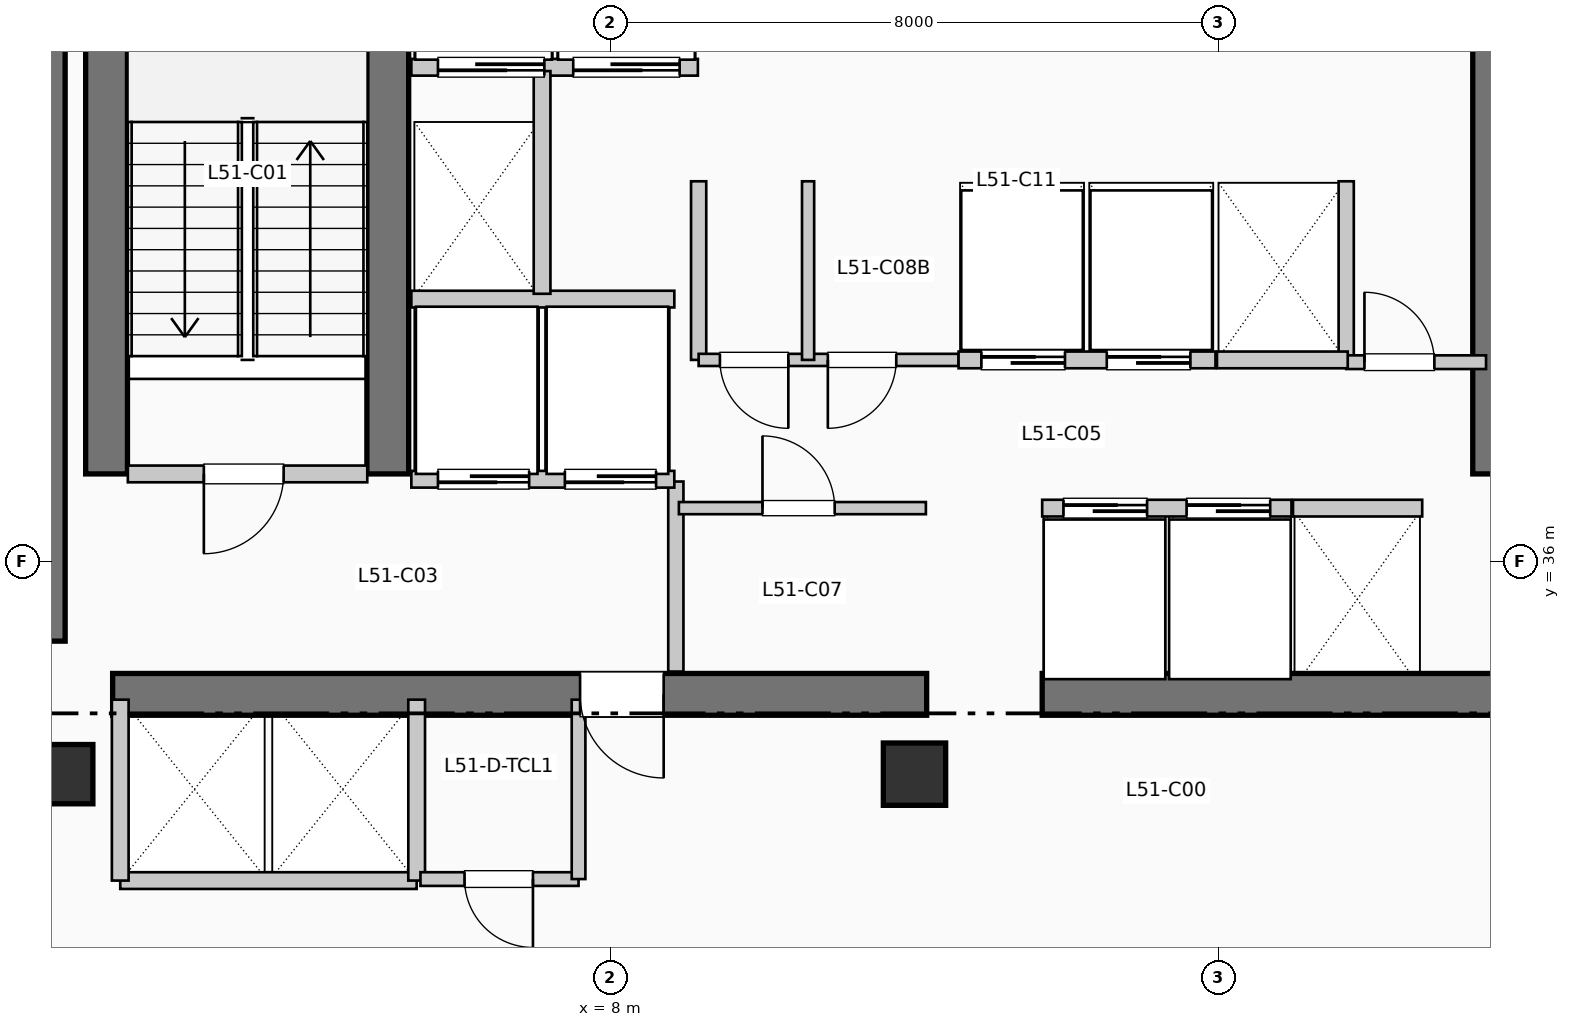
"""IFC4 building model, lengths in metres.
Left out: names, types, materials, properties, quantities, classifications, styles, units other than length and angle.
Written with IfcOpenShell. Run it as: python <this file> out.ifc"""

import sys

from ifc_helpers import new_model, si_unit, direction, frame, frame_2d, origin, origin_2d, place, context, subcontext, project, spatial, rectangle, extrude, element, fill, save


model = new_model("IFC4")
c1 = context("Model", 3, precision=1e-05, world=origin(), true_north=direction((0.0, 1.0)))
c2 = subcontext(c1, "Body", "Model", "MODEL_VIEW")
j1 = project(units=[si_unit("LENGTHUNIT", "METRE"), si_unit("PLANEANGLEUNIT", "RADIAN")], contexts=[c1])
p1 = place(None, origin())
s1 = spatial("IfcSite", under=j1, at=p1, CompositionType="ELEMENT")
p2 = place(p1, origin())
s2 = spatial("IfcBuilding", under=s1, at=p2, CompositionType="ELEMENT")
p3 = place(p2, frame((0.0, 0.0, 211.2)))
s3 = spatial("IfcBuildingStorey", under=s2, at=p3, CompositionType="ELEMENT", Elevation=211.2)
p4 = place(p3, frame((0.5, 34.95, 0.0), z_axis=(0.0, 0.0, 1.0), x_axis=(0.0, 1.0, 0.0)))
e1 = element("IfcWall", 1, at=p4, inside=s3, PredefinedType="SHEAR", context=c2, shape_type="SweptSolid", body=[
    extrude(rectangle(XDim=7.9, YDim=0.65, at=frame_2d((3.95, 0.0))), origin(), (0.0, 0.0, 1.0), 3.96),
])
p5 = place(p3, frame((1.45, 34.25, 0.0), z_axis=(0.0, 0.0, 1.0), x_axis=(1.0, 0.0, 0.0)))
e2 = element("IfcWall", 2, at=p5, inside=s3, PredefinedType="SHEAR", context=c2, shape_type="SweptSolid", body=[
    extrude(rectangle(XDim=10.71, YDim=0.55, at=frame_2d((5.355, 0.0))), origin(), (0.0, 0.0, 1.0), 3.96),
])
p6 = place(p5, frame((7.25, 0.0, 0.0), z_axis=(0.0, 0.0, 1.0), x_axis=(-1.0, 0.0, 0.0)))
e3 = element("IfcOpeningElement", 3, at=p6, cuts=e2, PredefinedType="OPENING", context=c2, shape_type="SweptSolid", body=[
    extrude(rectangle(XDim=1.1, YDim=2.15, at=frame_2d((0.55, 1.075))), frame((0.0, 0.285, 0.0), z_axis=(0.0, -1.0, 0.0), x_axis=(1.0, 0.0, 0.0)), (0.0, 0.0, 1.0), 0.57),
])
p7 = place(p3, frame((13.68, 34.25, 0.0), z_axis=(0.0, 0.0, 1.0), x_axis=(1.0, 0.0, 0.0)))
e4 = element("IfcWall", 4, at=p7, inside=s3, PredefinedType="SHEAR", context=c2, shape_type="SweptSolid", body=[
    extrude(rectangle(XDim=6.12, YDim=0.55, at=frame_2d((3.06, 0.0))), origin(), (0.0, 0.0, 1.0), 3.96),
])
for number, where, z_axis, x_axis in (
    (5, (1.37, 37.15, 0.0), (0.0, 0.0, 1.0), (0.0, 1.0, 0.0)),
    (6, (5.07, 37.15, 0.0), (0.0, 0.0, 1.0), (0.0, 1.0, 0.0)),
    (7, (19.62, 37.15, 0.0), (0.0, 0.0, 1.0), (0.0, 1.0, 0.0)),
):
    element("IfcWall", number, at=place(p3, frame(where, z_axis=z_axis, x_axis=x_axis)), inside=s3, PredefinedType="SHEAR", context=c2, shape_type="SweptSolid", body=[
        extrude(rectangle(XDim=7.89, YDim=0.55, at=frame_2d((3.945, 0.0))), origin(), (0.0, 0.0, 1.0), 3.96),
    ])
p8 = place(p3, frame((0.8, 33.2, 0.0), z_axis=(0.0, 0.0, 1.0), x_axis=(1.0, 0.0, 0.0)))
e8 = element("IfcColumn", 8, at=p8, inside=s3, PredefinedType="COLUMN", context=c2, shape_type="SweptSolid", body=[
    extrude(rectangle(XDim=0.78, YDim=0.78, at=origin_2d()), origin(), (0.0, 0.0, 1.0), 3.96),
])
p9 = place(p3, frame((12.0, 33.2, 0.0), z_axis=(0.0, 0.0, 1.0), x_axis=(1.0, 0.0, 0.0)))
e9 = element("IfcColumn", 9, at=p9, inside=s3, PredefinedType="COLUMN", context=c2, shape_type="SweptSolid", body=[
    extrude(rectangle(XDim=0.82, YDim=0.82, at=origin_2d()), origin(), (0.0, 0.0, 1.0), 3.96),
])
p10 = place(p3, frame((1.65, 37.15, 0.0), z_axis=(0.0, 0.0, 1.0), x_axis=(1.0, 0.0, 0.0)))
e10 = element("IfcWall", 10, at=p10, inside=s3, PredefinedType="PARTITIONING", context=c2, shape_type="SweptSolid", body=[
    extrude(rectangle(XDim=3.15, YDim=0.22, at=frame_2d((1.575, 0.0))), origin(), (0.0, 0.0, 1.0), 3.71),
])
p11 = place(p10, frame((2.05, 0.0, 0.0), z_axis=(0.0, 0.0, 1.0), x_axis=(-1.0, 0.0, 0.0)))
e11 = element("IfcOpeningElement", 11, at=p11, cuts=e10, PredefinedType="OPENING", context=c2, shape_type="SweptSolid", body=[
    extrude(rectangle(XDim=1.05, YDim=2.15, at=frame_2d((0.525, 1.075))), frame((0.0, 0.12, 0.0), z_axis=(0.0, -1.0, 0.0), x_axis=(1.0, 0.0, 0.0)), (0.0, 0.0, 1.0), 0.24),
])
p12 = place(p3, frame((8.86, 34.55, 0.0), z_axis=(0.0, 0.0, 1.0), x_axis=(0.0, 1.0, 0.0)))
e12 = element("IfcWall", 12, at=p12, inside=s3, PredefinedType="PARTITIONING", context=c2, shape_type="SweptSolid", body=[
    extrude(rectangle(XDim=2.5, YDim=0.2, at=frame_2d((1.25, 0.0))), origin(), (0.0, 0.0, 1.0), 3.71),
])
p13 = place(p3, frame((5.38, 37.08, 0.0), z_axis=(0.0, 0.0, 1.0), x_axis=(1.0, 0.0, 0.0)))
e13 = element("IfcWall", 13, at=p13, inside=s3, PredefinedType="PARTITIONING", context=c2, shape_type="SweptSolid", body=[
    extrude(rectangle(XDim=3.46, YDim=0.22, at=frame_2d((1.73, 0.0))), origin(), (0.0, 0.0, 1.0), 3.71),
])
p14 = place(p13, frame((1.55, 0.0, 0.0), z_axis=(0.0, 0.0, 1.0), x_axis=(-1.0, 0.0, 0.0)))
e14 = element("IfcOpeningElement", 14, at=p14, cuts=e13, PredefinedType="OPENING", context=c2, shape_type="SweptSolid", body=[
    extrude(rectangle(XDim=1.2, YDim=2.2, at=frame_2d((0.6, 1.1))), frame((0.0, 0.12, 0.0), z_axis=(0.0, -1.0, 0.0), x_axis=(1.0, 0.0, 0.0)), (0.0, 0.0, 1.0), 0.24),
])
p15 = place(p13, frame((3.22, 0.0, 0.0), z_axis=(0.0, 0.0, 1.0), x_axis=(-1.0, 0.0, 0.0)))
e15 = element("IfcOpeningElement", 15, at=p15, cuts=e13, PredefinedType="OPENING", context=c2, shape_type="SweptSolid", body=[
    extrude(rectangle(XDim=1.2, YDim=2.2, at=frame_2d((0.6, 1.1))), frame((0.0, 0.12, 0.0), z_axis=(0.0, -1.0, 0.0), x_axis=(1.0, 0.0, 0.0)), (0.0, 0.0, 1.0), 0.24),
])
p16 = place(p3, frame((5.38, 39.45, 0.0), z_axis=(0.0, 0.0, 1.0), x_axis=(1.0, 0.0, 0.0)))
e16 = element("IfcWall", 16, at=p16, inside=s3, PredefinedType="PARTITIONING", context=c2, shape_type="SweptSolid", body=[
    extrude(rectangle(XDim=3.46, YDim=0.22, at=frame_2d((1.73, 0.0))), origin(), (0.0, 0.0, 1.0), 3.71),
])
p17 = place(p3, frame((5.38, 42.5, 0.0), z_axis=(0.0, 0.0, 1.0), x_axis=(1.0, 0.0, 0.0)))
e17 = element("IfcWall", 17, at=p17, inside=s3, PredefinedType="PARTITIONING", context=c2, shape_type="SweptSolid", body=[
    extrude(rectangle(XDim=3.77, YDim=0.22, at=frame_2d((1.885, 0.0))), origin(), (0.0, 0.0, 1.0), 3.71),
])
p18 = place(p17, frame((1.75, 0.0, 0.0), z_axis=(0.0, 0.0, 1.0), x_axis=(-1.0, 0.0, 0.0)))
e18 = element("IfcOpeningElement", 18, at=p18, cuts=e17, PredefinedType="OPENING", context=c2, shape_type="SweptSolid", body=[
    extrude(rectangle(XDim=1.4, YDim=2.2, at=frame_2d((0.7, 1.1))), frame((0.0, 0.12, 0.0), z_axis=(0.0, -1.0, 0.0), x_axis=(1.0, 0.0, 0.0)), (0.0, 0.0, 1.0), 0.24),
])
p19 = place(p17, frame((3.53, 0.0, 0.0), z_axis=(0.0, 0.0, 1.0), x_axis=(-1.0, 0.0, 0.0)))
e19 = element("IfcOpeningElement", 19, at=p19, cuts=e17, PredefinedType="OPENING", context=c2, shape_type="SweptSolid", body=[
    extrude(rectangle(XDim=1.4, YDim=2.2, at=frame_2d((0.7, 1.1))), frame((0.0, 0.12, 0.0), z_axis=(0.0, -1.0, 0.0), x_axis=(1.0, 0.0, 0.0)), (0.0, 0.0, 1.0), 0.24),
])
p20 = place(p3, frame((7.1, 39.52, 0.0), z_axis=(0.0, 0.0, 1.0), x_axis=(0.0, 1.0, 0.0)))
e20 = element("IfcWall", 20, at=p20, inside=s3, PredefinedType="PARTITIONING", context=c2, shape_type="SweptSolid", body=[
    extrude(rectangle(XDim=2.93, YDim=0.22, at=frame_2d((1.465, 0.0))), origin(), (0.0, 0.0, 1.0), 3.71),
])
p21 = place(p3, frame((1.55, 31.8, 0.0), z_axis=(0.0, 0.0, 1.0), x_axis=(1.0, 0.0, 0.0)))
e21 = element("IfcWall", 21, at=p21, inside=s3, PredefinedType="PARTITIONING", context=c2, shape_type="SweptSolid", body=[
    extrude(rectangle(XDim=3.9, YDim=0.22, at=frame_2d((1.95, 0.0))), origin(), (0.0, 0.0, 1.0), 3.71),
])
for number, where, z_axis, x_axis in (
    (22, (1.55, 31.8, 0.0), (0.0, 0.0, 1.0), (0.0, 1.0, 0.0)),
    (23, (5.45, 31.8, 0.0), (0.0, 0.0, 1.0), (0.0, 1.0, 0.0)),
):
    element("IfcWall", number, at=place(p3, frame(where, z_axis=z_axis, x_axis=x_axis)), inside=s3, PredefinedType="PARTITIONING", context=c2, shape_type="SweptSolid", body=[
        extrude(rectangle(XDim=2.38, YDim=0.22, at=frame_2d((1.19, 0.0))), origin(), (0.0, 0.0, 1.0), 3.71),
    ])
for number, where, z_axis, x_axis in (
    (24, (9.16, 38.65, 0.0), (0.0, 0.0, 1.0), (0.0, 1.0, 0.0)),
    (25, (17.68, 38.65, 0.0), (0.0, 0.0, 1.0), (0.0, 1.0, 0.0)),
):
    element("IfcWall", number, at=place(p3, frame(where, z_axis=z_axis, x_axis=x_axis)), inside=s3, PredefinedType="PARTITIONING", context=c2, shape_type="SweptSolid", body=[
        extrude(rectangle(XDim=2.35, YDim=0.2, at=frame_2d((1.175, 0.0))), origin(), (0.0, 0.0, 1.0), 3.71),
    ])
p22 = place(p3, frame((17.68, 38.62, 0.0), z_axis=(0.0, 0.0, 1.0), x_axis=(1.0, 0.0, 0.0)))
e26 = element("IfcWall", 26, at=p22, inside=s3, PredefinedType="PARTITIONING", context=c2, shape_type="SweptSolid", body=[
    extrude(rectangle(XDim=1.84, YDim=0.18, at=frame_2d((0.92, 0.0))), origin(), (0.0, 0.0, 1.0), 3.71),
])
p23 = place(p22, frame((0.24, 0.0, 0.0)))
e27 = element("IfcOpeningElement", 27, at=p23, cuts=e26, PredefinedType="OPENING", context=c2, shape_type="SweptSolid", body=[
    extrude(rectangle(XDim=0.92, YDim=2.1, at=frame_2d((0.46, 1.05))), frame((0.0, 0.1, 0.0), z_axis=(0.0, -1.0, 0.0), x_axis=(1.0, 0.0, 0.0)), (0.0, 0.0, 1.0), 0.2),
])
p24 = place(p3, frame((5.5, 31.82, 0.0), z_axis=(0.0, 0.0, 1.0), x_axis=(1.0, 0.0, 0.0)))
e28 = element("IfcWall", 28, at=p24, inside=s3, PredefinedType="PLUMBINGWALL", context=c2, shape_type="SweptSolid", body=[
    extrude(rectangle(XDim=2.08, YDim=0.18, at=frame_2d((1.04, 0.0))), origin(), (0.0, 0.0, 1.0), 3.71),
])
p25 = place(p24, frame((1.48, 0.0, 0.0), z_axis=(0.0, 0.0, 1.0), x_axis=(-1.0, 0.0, 0.0)))
e29 = element("IfcOpeningElement", 29, at=p25, cuts=e28, PredefinedType="OPENING", context=c2, shape_type="SweptSolid", body=[
    extrude(rectangle(XDim=0.9, YDim=2.1, at=frame_2d((0.45, 1.05))), frame((0.0, 0.1, 0.0), z_axis=(0.0, -1.0, 0.0), x_axis=(1.0, 0.0, 0.0)), (0.0, 0.0, 1.0), 0.2),
])
p26 = place(p3, frame((7.58, 31.82, 0.0), z_axis=(0.0, 0.0, 1.0), x_axis=(0.0, 1.0, 0.0)))
e30 = element("IfcWall", 30, at=p26, inside=s3, PredefinedType="PLUMBINGWALL", context=c2, shape_type="SweptSolid", body=[
    extrude(rectangle(XDim=2.36, YDim=0.18, at=frame_2d((1.18, 0.0))), origin(), (0.0, 0.0, 1.0), 3.71),
])
p27 = place(p3, frame((8.9, 36.7, 0.0), z_axis=(0.0, 0.0, 1.0), x_axis=(1.0, 0.0, 0.0)))
e31 = element("IfcWall", 31, at=p27, inside=s3, PredefinedType="PARTITIONING", context=c2, shape_type="SweptSolid", body=[
    extrude(rectangle(XDim=3.25, YDim=0.16, at=frame_2d((1.625, 0.0))), origin(), (0.0, 0.0, 1.0), 3.71),
])
p28 = place(p27, frame((1.1, 0.0, 0.0)))
e32 = element("IfcOpeningElement", 32, at=p28, cuts=e31, PredefinedType="OPENING", context=c2, shape_type="SweptSolid", body=[
    extrude(rectangle(XDim=0.95, YDim=2.15, at=frame_2d((0.475, 1.075))), frame((0.0, 0.09, 0.0), z_axis=(0.0, -1.0, 0.0), x_axis=(1.0, 0.0, 0.0)), (0.0, 0.0, 1.0), 0.18),
])
p29 = place(p3, frame((9.16, 38.65, 0.0), z_axis=(0.0, 0.0, 1.0), x_axis=(1.0, 0.0, 0.0)))
e33 = element("IfcWall", 33, at=p29, inside=s3, PredefinedType="PARTITIONING", context=c2, shape_type="SweptSolid", body=[
    extrude(rectangle(XDim=3.42, YDim=0.16, at=frame_2d((1.71, 0.0))), origin(), (0.0, 0.0, 1.0), 3.71),
])
p30 = place(p29, frame((1.18, 0.0, 0.0), z_axis=(0.0, 0.0, 1.0), x_axis=(-1.0, 0.0, 0.0)))
e34 = element("IfcOpeningElement", 34, at=p30, cuts=e33, PredefinedType="OPENING", context=c2, shape_type="SweptSolid", body=[
    extrude(rectangle(XDim=0.9, YDim=2.15, at=frame_2d((0.45, 1.075))), frame((0.0, 0.09, 0.0), z_axis=(0.0, -1.0, 0.0), x_axis=(1.0, 0.0, 0.0)), (0.0, 0.0, 1.0), 0.18),
])
p31 = place(p29, frame((2.6, 0.0, 0.0), z_axis=(0.0, 0.0, 1.0), x_axis=(-1.0, 0.0, 0.0)))
e35 = element("IfcOpeningElement", 35, at=p31, cuts=e33, PredefinedType="OPENING", context=c2, shape_type="SweptSolid", body=[
    extrude(rectangle(XDim=0.9, YDim=2.15, at=frame_2d((0.45, 1.075))), frame((0.0, 0.09, 0.0), z_axis=(0.0, -1.0, 0.0), x_axis=(1.0, 0.0, 0.0)), (0.0, 0.0, 1.0), 0.18),
])
p32 = place(p3, frame((10.6, 38.65, 0.0), z_axis=(0.0, 0.0, 1.0), x_axis=(0.0, 1.0, 0.0)))
e36 = element("IfcWall", 36, at=p32, inside=s3, PredefinedType="PARTITIONING", context=c2, shape_type="SweptSolid", body=[
    extrude(rectangle(XDim=2.35, YDim=0.16, at=frame_2d((1.175, 0.0))), origin(), (0.0, 0.0, 1.0), 3.71),
])
p33 = place(p3, frame((13.68, 36.7, 0.0), z_axis=(0.0, 0.0, 1.0), x_axis=(1.0, 0.0, 0.0)))
e37 = element("IfcWall", 37, at=p33, inside=s3, PredefinedType="PARTITIONING", context=c2, shape_type="SweptSolid", body=[
    extrude(rectangle(XDim=3.28, YDim=0.22, at=frame_2d((1.64, 0.0))), origin(), (0.0, 0.0, 1.0), 3.71),
])
p34 = place(p33, frame((0.28, 0.0, 0.0)))
e38 = element("IfcOpeningElement", 38, at=p34, cuts=e37, PredefinedType="OPENING", context=c2, shape_type="SweptSolid", body=[
    extrude(rectangle(XDim=1.1, YDim=2.2, at=frame_2d((0.55, 1.1))), frame((0.0, 0.12, 0.0), z_axis=(0.0, -1.0, 0.0), x_axis=(1.0, 0.0, 0.0)), (0.0, 0.0, 1.0), 0.24),
])
p35 = place(p33, frame((1.9, 0.0, 0.0)))
e39 = element("IfcOpeningElement", 39, at=p35, cuts=e37, PredefinedType="OPENING", context=c2, shape_type="SweptSolid", body=[
    extrude(rectangle(XDim=1.1, YDim=2.2, at=frame_2d((0.55, 1.1))), frame((0.0, 0.12, 0.0), z_axis=(0.0, -1.0, 0.0), x_axis=(1.0, 0.0, 0.0)), (0.0, 0.0, 1.0), 0.24),
])
p36 = place(p3, frame((12.58, 38.65, 0.0), z_axis=(0.0, 0.0, 1.0), x_axis=(1.0, 0.0, 0.0)))
e40 = element("IfcWall", 40, at=p36, inside=s3, PredefinedType="PARTITIONING", context=c2, shape_type="SweptSolid", body=[
    extrude(rectangle(XDim=3.38, YDim=0.22, at=frame_2d((1.69, 0.0))), origin(), (0.0, 0.0, 1.0), 3.71),
])
p37 = place(p36, frame((0.3, 0.0, 0.0)))
e41 = element("IfcOpeningElement", 41, at=p37, cuts=e40, PredefinedType="OPENING", context=c2, shape_type="SweptSolid", body=[
    extrude(rectangle(XDim=1.1, YDim=2.2, at=frame_2d((0.55, 1.1))), frame((0.0, 0.12, 0.0), z_axis=(0.0, -1.0, 0.0), x_axis=(1.0, 0.0, 0.0)), (0.0, 0.0, 1.0), 0.24),
])
p38 = place(p36, frame((1.95, 0.0, 0.0)))
e42 = element("IfcOpeningElement", 42, at=p38, cuts=e40, PredefinedType="OPENING", context=c2, shape_type="SweptSolid", body=[
    extrude(rectangle(XDim=1.1, YDim=2.2, at=frame_2d((0.55, 1.1))), frame((0.0, 0.12, 0.0), z_axis=(0.0, -1.0, 0.0), x_axis=(1.0, 0.0, 0.0)), (0.0, 0.0, 1.0), 0.24),
])
p39 = place(p3, frame((16.98, 36.7, 0.0), z_axis=(0.0, 0.0, 1.0), x_axis=(1.0, 0.0, 0.0)))
e43 = element("IfcWall", 43, at=p39, inside=s3, PredefinedType="PARTITIONING", context=c2, shape_type="SweptSolid", body=[
    extrude(rectangle(XDim=1.7, YDim=0.22, at=frame_2d((0.85, 0.0))), origin(), (0.0, 0.0, 1.0), 3.71),
])
p40 = place(p3, frame((15.98, 38.65, 0.0), z_axis=(0.0, 0.0, 1.0), x_axis=(1.0, 0.0, 0.0)))
e44 = element("IfcWall", 44, at=p40, inside=s3, PredefinedType="PARTITIONING", context=c2, shape_type="SweptSolid", body=[
    extrude(rectangle(XDim=1.72, YDim=0.22, at=frame_2d((0.86, 0.0))), origin(), (0.0, 0.0, 1.0), 3.71),
])
p41 = place(p11, origin())
e45 = element("IfcDoor", 45, at=p41, inside=s3, OperationType="SINGLE_SWING_LEFT", PredefinedType="DOOR", context=c2, shape_type="SweptSolid", body=[
    extrude(rectangle(XDim=1.05, YDim=2.15, at=frame_2d((0.525, 1.075))), frame((0.0, 0.025, 0.0), z_axis=(0.0, -1.0, 0.0), x_axis=(1.0, 0.0, 0.0)), (0.0, 0.0, 1.0), 0.05),
])
fill(e11, e45)
p42 = place(p6, origin())
e46 = element("IfcDoor", 46, at=p42, inside=s3, OperationType="SINGLE_SWING_RIGHT", PredefinedType="DOOR", context=c2, shape_type="SweptSolid", body=[
    extrude(rectangle(XDim=1.1, YDim=2.15, at=frame_2d((0.55, 1.075))), frame((0.0, 0.025, 0.0), z_axis=(0.0, -1.0, 0.0), x_axis=(1.0, 0.0, 0.0)), (0.0, 0.0, 1.0), 0.05),
])
fill(e3, e46)
p43 = place(p14, origin())
e47 = element("IfcDoor", 47, at=p43, inside=s3, OperationType="SLIDING_TO_RIGHT", PredefinedType="DOOR", context=c2, shape_type="SweptSolid", body=[
    extrude(rectangle(XDim=1.2, YDim=2.2, at=frame_2d((0.6, 1.1))), frame((0.0, 0.025, 0.0), z_axis=(0.0, -1.0, 0.0), x_axis=(1.0, 0.0, 0.0)), (0.0, 0.0, 1.0), 0.05),
])
fill(e14, e47)
p44 = place(p15, origin())
e48 = element("IfcDoor", 48, at=p44, inside=s3, OperationType="SLIDING_TO_RIGHT", PredefinedType="DOOR", context=c2, shape_type="SweptSolid", body=[
    extrude(rectangle(XDim=1.2, YDim=2.2, at=frame_2d((0.6, 1.1))), frame((0.0, 0.025, 0.0), z_axis=(0.0, -1.0, 0.0), x_axis=(1.0, 0.0, 0.0)), (0.0, 0.0, 1.0), 0.05),
])
fill(e15, e48)
p45 = place(p18, origin())
e49 = element("IfcDoor", 49, at=p45, inside=s3, OperationType="SLIDING_TO_LEFT", PredefinedType="DOOR", context=c2, shape_type="SweptSolid", body=[
    extrude(rectangle(XDim=1.4, YDim=2.2, at=frame_2d((0.7, 1.1))), frame((0.0, 0.025, 0.0), z_axis=(0.0, -1.0, 0.0), x_axis=(1.0, 0.0, 0.0)), (0.0, 0.0, 1.0), 0.05),
])
fill(e18, e49)
p46 = place(p19, origin())
e50 = element("IfcDoor", 50, at=p46, inside=s3, OperationType="SLIDING_TO_LEFT", PredefinedType="DOOR", context=c2, shape_type="SweptSolid", body=[
    extrude(rectangle(XDim=1.4, YDim=2.2, at=frame_2d((0.7, 1.1))), frame((0.0, 0.025, 0.0), z_axis=(0.0, -1.0, 0.0), x_axis=(1.0, 0.0, 0.0)), (0.0, 0.0, 1.0), 0.05),
])
fill(e19, e50)
p47 = place(p23, origin())
e51 = element("IfcDoor", 51, at=p47, inside=s3, OperationType="SINGLE_SWING_LEFT", PredefinedType="DOOR", context=c2, shape_type="SweptSolid", body=[
    extrude(rectangle(XDim=0.92, YDim=2.1, at=frame_2d((0.46, 1.05))), frame((0.0, 0.025, 0.0), z_axis=(0.0, -1.0, 0.0), x_axis=(1.0, 0.0, 0.0)), (0.0, 0.0, 1.0), 0.05),
])
fill(e27, e51)
p48 = place(p25, origin())
e52 = element("IfcDoor", 52, at=p48, inside=s3, OperationType="SINGLE_SWING_RIGHT", PredefinedType="DOOR", context=c2, shape_type="SweptSolid", body=[
    extrude(rectangle(XDim=0.9, YDim=2.1, at=frame_2d((0.45, 1.05))), frame((0.0, 0.025, 0.0), z_axis=(0.0, -1.0, 0.0), x_axis=(1.0, 0.0, 0.0)), (0.0, 0.0, 1.0), 0.05),
])
fill(e29, e52)
p49 = place(p28, origin())
e53 = element("IfcDoor", 53, at=p49, inside=s3, OperationType="SINGLE_SWING_LEFT", PredefinedType="DOOR", context=c2, shape_type="SweptSolid", body=[
    extrude(rectangle(XDim=0.95, YDim=2.15, at=frame_2d((0.475, 1.075))), frame((0.0, 0.025, 0.0), z_axis=(0.0, -1.0, 0.0), x_axis=(1.0, 0.0, 0.0)), (0.0, 0.0, 1.0), 0.05),
])
fill(e32, e53)
p50 = place(p30, origin())
e54 = element("IfcDoor", 54, at=p50, inside=s3, OperationType="SINGLE_SWING_RIGHT", PredefinedType="DOOR", context=c2, shape_type="SweptSolid", body=[
    extrude(rectangle(XDim=0.9, YDim=2.15, at=frame_2d((0.45, 1.075))), frame((0.0, 0.025, 0.0), z_axis=(0.0, -1.0, 0.0), x_axis=(1.0, 0.0, 0.0)), (0.0, 0.0, 1.0), 0.05),
])
fill(e34, e54)
p51 = place(p31, origin())
e55 = element("IfcDoor", 55, at=p51, inside=s3, OperationType="SINGLE_SWING_LEFT", PredefinedType="DOOR", context=c2, shape_type="SweptSolid", body=[
    extrude(rectangle(XDim=0.9, YDim=2.15, at=frame_2d((0.45, 1.075))), frame((0.0, 0.025, 0.0), z_axis=(0.0, -1.0, 0.0), x_axis=(1.0, 0.0, 0.0)), (0.0, 0.0, 1.0), 0.05),
])
fill(e35, e55)
p52 = place(p34, origin())
e56 = element("IfcDoor", 56, at=p52, inside=s3, OperationType="SLIDING_TO_RIGHT", PredefinedType="DOOR", context=c2, shape_type="SweptSolid", body=[
    extrude(rectangle(XDim=1.1, YDim=2.2, at=frame_2d((0.55, 1.1))), frame((0.0, 0.025, 0.0), z_axis=(0.0, -1.0, 0.0), x_axis=(1.0, 0.0, 0.0)), (0.0, 0.0, 1.0), 0.05),
])
fill(e38, e56)
p53 = place(p35, origin())
e57 = element("IfcDoor", 57, at=p53, inside=s3, OperationType="SLIDING_TO_RIGHT", PredefinedType="DOOR", context=c2, shape_type="SweptSolid", body=[
    extrude(rectangle(XDim=1.1, YDim=2.2, at=frame_2d((0.55, 1.1))), frame((0.0, 0.025, 0.0), z_axis=(0.0, -1.0, 0.0), x_axis=(1.0, 0.0, 0.0)), (0.0, 0.0, 1.0), 0.05),
])
fill(e39, e57)
p54 = place(p37, origin())
e58 = element("IfcDoor", 58, at=p54, inside=s3, OperationType="SLIDING_TO_RIGHT", PredefinedType="DOOR", context=c2, shape_type="SweptSolid", body=[
    extrude(rectangle(XDim=1.1, YDim=2.2, at=frame_2d((0.55, 1.1))), frame((0.0, 0.025, 0.0), z_axis=(0.0, -1.0, 0.0), x_axis=(1.0, 0.0, 0.0)), (0.0, 0.0, 1.0), 0.05),
])
fill(e41, e58)
p55 = place(p38, origin())
e59 = element("IfcDoor", 59, at=p55, inside=s3, OperationType="SLIDING_TO_RIGHT", PredefinedType="DOOR", context=c2, shape_type="SweptSolid", body=[
    extrude(rectangle(XDim=1.1, YDim=2.2, at=frame_2d((0.55, 1.1))), frame((0.0, 0.025, 0.0), z_axis=(0.0, -1.0, 0.0), x_axis=(1.0, 0.0, 0.0)), (0.0, 0.0, 1.0), 0.05),
])
fill(e42, e59)
save(model, sys.argv[1])
